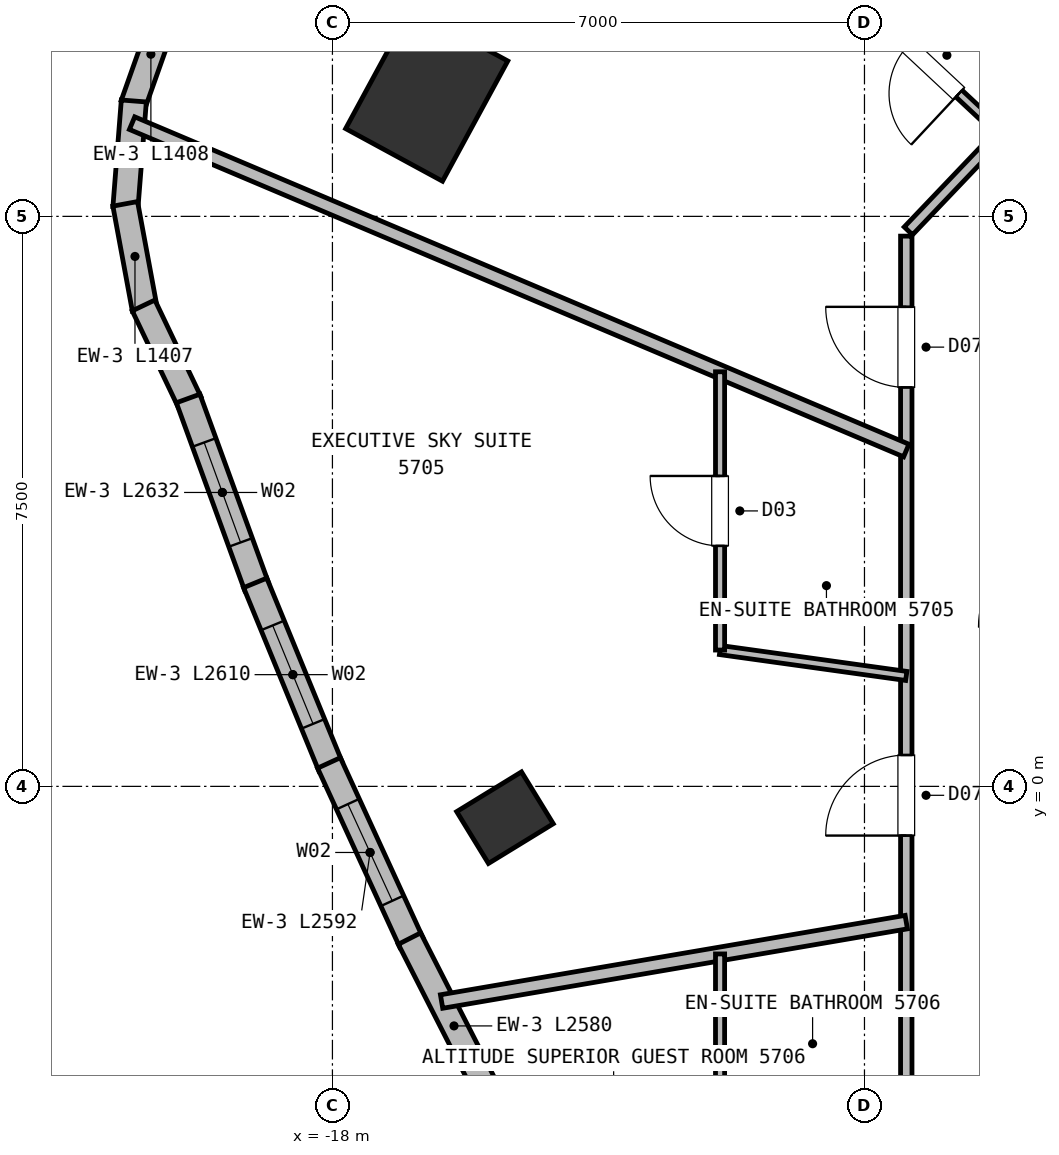
"""IFC4 building model, lengths in metres.
Left out: names, types, materials, properties, quantities, classifications, styles, units other than length and angle.
Written with IfcOpenShell. Run it as: python <this file> out.ifc"""

import sys

from ifc_helpers import new_model, si_unit, direction, frame, frame_2d, origin, origin_2d, place, context, subcontext, project, spatial, rectangle, extrude, element, fill, save


model = new_model("IFC4")
c1 = context("Model", 3, precision=1e-05, world=origin(), true_north=direction((0.0, 1.0)))
c2 = subcontext(c1, "Body", "Model", "MODEL_VIEW")
j1 = project(units=[si_unit("LENGTHUNIT", "METRE"), si_unit("PLANEANGLEUNIT", "RADIAN")], contexts=[c1])
p1 = place(None, origin())
s1 = spatial("IfcSite", under=j1, at=p1, CompositionType="ELEMENT")
p2 = place(p1, origin())
s2 = spatial("IfcBuilding", under=s1, at=p2, CompositionType="ELEMENT")
p3 = place(p2, frame((0.0, 0.0, 216.95)))
s3 = spatial("IfcBuildingStorey", under=s2, at=p3, CompositionType="ELEMENT", Elevation=216.95)
p4 = place(p3, frame((-16.76, 9.1, 0.0), z_axis=(0.0, 0.0, 1.0), x_axis=(-0.878817112662, 0.47715876026, 0.0)))
e1 = element("IfcColumn", 1, at=p4, inside=s3, PredefinedType="COLUMN", context=c2, shape_type="SweptSolid", body=[
    extrude(rectangle(XDim=1.45, YDim=1.8, at=origin_2d()), origin(), (0.0, 0.0, 1.0), 3.8),
])
p5 = place(p3, frame((-15.73, -0.412, 0.0), z_axis=(0.0, 0.0, 1.0), x_axis=(-0.522498564716, 0.852640164354, 0.0)))
e2 = element("IfcColumn", 2, at=p5, inside=s3, PredefinedType="COLUMN", context=c2, shape_type="SweptSolid", body=[
    extrude(rectangle(XDim=0.8, YDim=1.0, at=origin_2d()), origin(), (0.0, 0.0, 1.0), 3.8),
])
p6 = place(p3, frame((-20.623, 8.97, 0.0), z_axis=(0.0, 0.0, 1.0), x_axis=(0.333709077945, 0.942676111555, 0.0)))
e3 = element("IfcWall", 3, at=p6, inside=s3, PredefinedType="SOLIDWALL", context=c2, shape_type="SweptSolid", body=[
    extrude(rectangle(XDim=1.408, YDim=0.33, at=frame_2d((0.704, 0.0))), origin(), (0.0, 0.0, 1.0), 3.55),
])
p7 = place(p3, frame((-20.724, 7.615, 0.0), z_axis=(0.0, 0.0, 1.0), x_axis=(0.07857999626, 0.996907811278, 0.0)))
e4 = element("IfcWall", 4, at=p7, inside=s3, PredefinedType="SOLIDWALL", context=c2, shape_type="SweptSolid", body=[
    extrude(rectangle(XDim=1.407, YDim=0.33, at=frame_2d((0.704, 0.0))), origin(), (0.0, 0.0, 1.0), 3.55),
])
p8 = place(p3, frame((-20.469, 6.281, 0.0), z_axis=(0.0, 0.0, 1.0), x_axis=(-0.182455673353, 0.983214080077, 0.0)))
e5 = element("IfcWall", 5, at=p8, inside=s3, PredefinedType="SOLIDWALL", context=c2, shape_type="SweptSolid", body=[
    extrude(rectangle(XDim=1.408, YDim=0.33, at=frame_2d((0.704, 0.0))), origin(), (0.0, 0.0, 1.0), 3.55),
])
p9 = place(p3, frame((-19.879, 5.058, 0.0), z_axis=(0.0, 0.0, 1.0), x_axis=(-0.430694266873, 0.902497893894, 0.0)))
e6 = element("IfcWall", 6, at=p9, inside=s3, PredefinedType="SOLIDWALL", context=c2, shape_type="SweptSolid", body=[
    extrude(rectangle(XDim=1.407, YDim=0.33, at=frame_2d((0.704, 0.0))), origin(), (0.0, 0.0, 1.0), 3.55),
])
p10 = place(p3, frame((-18.998, 2.631, 0.0), z_axis=(0.0, 0.0, 1.0), x_axis=(-0.342100538488, 0.939663355445, 0.0)))
e7 = element("IfcWall", 7, at=p10, inside=s3, PredefinedType="SOLIDWALL", context=c2, shape_type="SweptSolid", body=[
    extrude(rectangle(XDim=2.632, YDim=0.33, at=frame_2d((1.316, 0.0))), origin(), (0.0, 0.0, 1.0), 3.55),
])
p11 = place(p10, frame((0.616, 0.0, 0.72)))
e8 = element("IfcOpeningElement", 8, at=p11, cuts=e7, PredefinedType="OPENING", context=c2, shape_type="SweptSolid", body=[
    extrude(rectangle(XDim=1.4, YDim=1.84, at=frame_2d((0.7, 0.92))), frame((0.0, 0.175, 0.0), z_axis=(0.0, -1.0, 0.0), x_axis=(1.0, 0.0, 0.0)), (0.0, 0.0, 1.0), 0.35),
])
p12 = place(p3, frame((-18.025, 0.263, 0.0), z_axis=(0.0, 0.0, 1.0), x_axis=(-0.379601522234, 0.925150087455, 0.0)))
e9 = element("IfcWall", 9, at=p12, inside=s3, PredefinedType="SOLIDWALL", context=c2, shape_type="SweptSolid", body=[
    extrude(rectangle(XDim=2.61, YDim=0.33, at=frame_2d((1.305, 0.0))), origin(), (0.0, 0.0, 1.0), 3.55),
])
p13 = place(p12, frame((0.605, 0.0, 0.72)))
e10 = element("IfcOpeningElement", 10, at=p13, cuts=e9, PredefinedType="OPENING", context=c2, shape_type="SweptSolid", body=[
    extrude(rectangle(XDim=1.4, YDim=1.84, at=frame_2d((0.7, 0.92))), frame((0.0, 0.175, 0.0), z_axis=(0.0, -1.0, 0.0), x_axis=(1.0, 0.0, 0.0)), (0.0, 0.0, 1.0), 0.35),
])
p14 = place(p3, frame((-16.964, -2.048, 0.0), z_axis=(0.0, 0.0, 1.0), x_axis=(-0.41697893771, 0.908916148776, 0.0)))
e11 = element("IfcWall", 11, at=p14, inside=s3, PredefinedType="SOLIDWALL", context=c2, shape_type="SweptSolid", body=[
    extrude(rectangle(XDim=2.593, YDim=0.33, at=frame_2d((1.296, 0.0))), origin(), (0.0, 0.0, 1.0), 3.55),
])
p15 = place(p14, frame((0.596, 0.0, 0.72)))
e12 = element("IfcOpeningElement", 12, at=p15, cuts=e11, PredefinedType="OPENING", context=c2, shape_type="SweptSolid", body=[
    extrude(rectangle(XDim=1.4, YDim=1.84, at=frame_2d((0.7, 0.92))), frame((0.0, 0.175, 0.0), z_axis=(0.0, -1.0, 0.0), x_axis=(1.0, 0.0, 0.0)), (0.0, 0.0, 1.0), 0.35),
])
p16 = place(p3, frame((-15.814, -4.301, 0.0), z_axis=(0.0, 0.0, 1.0), x_axis=(-0.454203650024, 0.890897886576, 0.0)))
e13 = element("IfcWall", 13, at=p16, inside=s3, PredefinedType="SOLIDWALL", context=c2, shape_type="SweptSolid", body=[
    extrude(rectangle(XDim=2.58, YDim=0.33, at=frame_2d((1.29, 0.0))), origin(), (0.0, 0.0, 1.0), 3.55),
])
p17 = place(p3, frame((-10.422, 7.309, 0.0), z_axis=(0.0, 0.0, 1.0), x_axis=(0.689960858356, 0.723846678473, 0.0)))
e14 = element("IfcWall", 14, at=p17, inside=s3, PredefinedType="PARTITIONING", context=c2, shape_type="SweptSolid", body=[
    extrude(rectangle(XDim=2.572, YDim=0.15, at=frame_2d((1.286, 0.0))), origin(), (0.0, 0.0, 1.0), 3.55),
])
p18 = place(p3, frame((-10.45, -7.24, 0.0), z_axis=(0.0, 0.0, 1.0), x_axis=(0.0, 1.0, 0.0)))
e15 = element("IfcWall", 15, at=p18, inside=s3, PredefinedType="PARTITIONING", context=c2, shape_type="SweptSolid", body=[
    extrude(rectangle(XDim=14.48, YDim=0.15, at=frame_2d((7.24, 0.0))), origin(), (0.0, 0.0, 1.0), 3.23),
])
p19 = place(p18, frame((0.909, 0.0, 0.0)))
e16 = element("IfcOpeningElement", 16, at=p19, cuts=e15, PredefinedType="OPENING", context=c2, shape_type="SweptSolid", body=[
    extrude(rectangle(XDim=1.0, YDim=2.15, at=frame_2d((0.5, 1.075))), frame((0.0, 0.085, 0.0), z_axis=(0.0, -1.0, 0.0), x_axis=(1.0, 0.0, 0.0)), (0.0, 0.0, 1.0), 0.17),
])
p20 = place(p18, frame((6.593, 0.0, 0.0)))
e17 = element("IfcOpeningElement", 17, at=p20, cuts=e15, PredefinedType="OPENING", context=c2, shape_type="SweptSolid", body=[
    extrude(rectangle(XDim=1.06, YDim=2.15, at=frame_2d((0.53, 1.075))), frame((0.0, 0.085, 0.0), z_axis=(0.0, -1.0, 0.0), x_axis=(1.0, 0.0, 0.0)), (0.0, 0.0, 1.0), 0.17),
])
p21 = place(p18, frame((12.49, 0.0, 0.0)))
e18 = element("IfcOpeningElement", 18, at=p21, cuts=e15, PredefinedType="OPENING", context=c2, shape_type="SweptSolid", body=[
    extrude(rectangle(XDim=1.06, YDim=2.15, at=frame_2d((0.53, 1.075))), frame((0.0, 0.085, 0.0), z_axis=(0.0, -1.0, 0.0), x_axis=(1.0, 0.0, 0.0)), (0.0, 0.0, 1.0), 0.17),
])
p22 = place(p3, frame((-9.198, 8.594, 0.0), z_axis=(0.0, 0.0, 1.0), x_axis=(-0.730664159642, 0.682737054666, 0.0)))
e19 = element("IfcWall", 19, at=p22, inside=s3, PredefinedType="PARTITIONING", context=c2, shape_type="SweptSolid", body=[
    extrude(rectangle(XDim=2.45, YDim=0.12, at=frame_2d((1.225, 0.0))), origin(), (0.0, 0.0, 1.0), 3.55),
])
p23 = place(p22, frame((0.765, 0.0, 0.0)))
e20 = element("IfcOpeningElement", 20, at=p23, cuts=e19, PredefinedType="OPENING", context=c2, shape_type="SweptSolid", body=[
    extrude(rectangle(XDim=0.92, YDim=2.1, at=frame_2d((0.46, 1.05))), frame((0.0, 0.07, 0.0), z_axis=(0.0, -1.0, 0.0), x_axis=(1.0, 0.0, 0.0)), (0.0, 0.0, 1.0), 0.14),
])
p24 = place(p3, frame((-10.45, 4.419, 0.0), z_axis=(0.0, 0.0, 1.0), x_axis=(-0.921035485522, 0.389478670032, 0.0)))
e21 = element("IfcWall", 21, at=p24, inside=s3, PredefinedType="PARTITIONING", context=c2, shape_type="SweptSolid", body=[
    extrude(rectangle(XDim=11.059, YDim=0.18, at=frame_2d((5.53, 0.0))), origin(), (0.0, 0.0, 1.0), 3.55),
])
p25 = place(p3, frame((-12.9, 1.794, 0.0), z_axis=(0.0, 0.0, 1.0), x_axis=(0.990475454298, -0.137689412929, 0.0)))
e22 = element("IfcWall", 22, at=p25, inside=s3, PredefinedType="PARTITIONING", context=c2, shape_type="SweptSolid", body=[
    extrude(rectangle(XDim=2.473, YDim=0.12, at=frame_2d((1.237, 0.0))), origin(), (0.0, 0.0, 1.0), 3.55),
])
p26 = place(p3, frame((-12.9, 1.794, 0.0), z_axis=(0.0, 0.0, 1.0), x_axis=(0.0, 1.0, 0.0)))
e23 = element("IfcWall", 23, at=p26, inside=s3, PredefinedType="PARTITIONING", context=c2, shape_type="SweptSolid", body=[
    extrude(rectangle(XDim=3.661, YDim=0.12, at=frame_2d((1.831, 0.0))), origin(), (0.0, 0.0, 1.0), 3.55),
])
p27 = place(p26, frame((1.371, 0.0, 0.0)))
e24 = element("IfcOpeningElement", 24, at=p27, cuts=e23, PredefinedType="OPENING", context=c2, shape_type="SweptSolid", body=[
    extrude(rectangle(XDim=0.92, YDim=2.1, at=frame_2d((0.46, 1.05))), frame((0.0, 0.07, 0.0), z_axis=(0.0, -1.0, 0.0), x_axis=(1.0, 0.0, 0.0)), (0.0, 0.0, 1.0), 0.14),
])
p28 = place(p3, frame((-10.45, -1.786, 0.0), z_axis=(0.0, 0.0, 1.0), x_axis=(-0.985707903362, -0.168463435946, 0.0)))
e25 = element("IfcWall", 25, at=p28, inside=s3, PredefinedType="PARTITIONING", context=c2, shape_type="SweptSolid", body=[
    extrude(rectangle(XDim=6.203, YDim=0.18, at=frame_2d((3.101, 0.0))), origin(), (0.0, 0.0, 1.0), 3.55),
])
p29 = place(p3, frame((-12.9, -2.205, 0.0), z_axis=(0.0, 0.0, 1.0), x_axis=(0.0, -1.0, 0.0)))
e26 = element("IfcWall", 26, at=p29, inside=s3, PredefinedType="PARTITIONING", context=c2, shape_type="SweptSolid", body=[
    extrude(rectangle(XDim=3.598, YDim=0.12, at=frame_2d((1.799, 0.0))), origin(), (0.0, 0.0, 1.0), 3.23),
])
p30 = place(p11, origin())
e27 = element("IfcWindow", 27, at=p30, inside=s3, PartitioningType="SINGLE_PANEL", PredefinedType="WINDOW", context=c2, shape_type="SweptSolid", body=[
    extrude(rectangle(XDim=1.4, YDim=1.84, at=frame_2d((0.7, 0.92))), frame((0.0, 0.03, 0.0), z_axis=(0.0, -1.0, 0.0), x_axis=(1.0, 0.0, 0.0)), (0.0, 0.0, 1.0), 0.06),
])
fill(e8, e27)
p31 = place(p13, origin())
e28 = element("IfcWindow", 28, at=p31, inside=s3, PartitioningType="SINGLE_PANEL", PredefinedType="WINDOW", context=c2, shape_type="SweptSolid", body=[
    extrude(rectangle(XDim=1.4, YDim=1.84, at=frame_2d((0.7, 0.92))), frame((0.0, 0.03, 0.0), z_axis=(0.0, -1.0, 0.0), x_axis=(1.0, 0.0, 0.0)), (0.0, 0.0, 1.0), 0.06),
])
fill(e10, e28)
p32 = place(p15, origin())
e29 = element("IfcWindow", 29, at=p32, inside=s3, PartitioningType="SINGLE_PANEL", PredefinedType="WINDOW", context=c2, shape_type="SweptSolid", body=[
    extrude(rectangle(XDim=1.4, YDim=1.84, at=frame_2d((0.7, 0.92))), frame((0.0, 0.03, 0.0), z_axis=(0.0, -1.0, 0.0), x_axis=(1.0, 0.0, 0.0)), (0.0, 0.0, 1.0), 0.06),
])
fill(e12, e29)
p33 = place(p23, origin())
e30 = element("IfcDoor", 30, at=p33, inside=s3, OperationType="SINGLE_SWING_LEFT", PredefinedType="DOOR", context=c2, shape_type="SweptSolid", body=[
    extrude(rectangle(XDim=0.92, YDim=2.1, at=frame_2d((0.46, 1.05))), frame((0.0, 0.025, 0.0), z_axis=(0.0, -1.0, 0.0), x_axis=(1.0, 0.0, 0.0)), (0.0, 0.0, 1.0), 0.05),
])
fill(e20, e30)
p34 = place(p27, origin())
e31 = element("IfcDoor", 31, at=p34, inside=s3, OperationType="SINGLE_SWING_RIGHT", PredefinedType="DOOR", context=c2, shape_type="SweptSolid", body=[
    extrude(rectangle(XDim=0.92, YDim=2.1, at=frame_2d((0.46, 1.05))), frame((0.0, 0.025, 0.0), z_axis=(0.0, -1.0, 0.0), x_axis=(1.0, 0.0, 0.0)), (0.0, 0.0, 1.0), 0.05),
])
fill(e24, e31)
p35 = place(p20, origin())
e32 = element("IfcDoor", 32, at=p35, inside=s3, OperationType="SINGLE_SWING_LEFT", PredefinedType="DOOR", context=c2, shape_type="SweptSolid", body=[
    extrude(rectangle(XDim=1.06, YDim=2.15, at=frame_2d((0.53, 1.075))), frame((0.0, 0.025, 0.0), z_axis=(0.0, -1.0, 0.0), x_axis=(1.0, 0.0, 0.0)), (0.0, 0.0, 1.0), 0.05),
])
fill(e17, e32)
p36 = place(p21, origin())
e33 = element("IfcDoor", 33, at=p36, inside=s3, OperationType="SINGLE_SWING_RIGHT", PredefinedType="DOOR", context=c2, shape_type="SweptSolid", body=[
    extrude(rectangle(XDim=1.06, YDim=2.15, at=frame_2d((0.53, 1.075))), frame((0.0, 0.025, 0.0), z_axis=(0.0, -1.0, 0.0), x_axis=(1.0, 0.0, 0.0)), (0.0, 0.0, 1.0), 0.05),
])
fill(e18, e33)
save(model, sys.argv[1])
